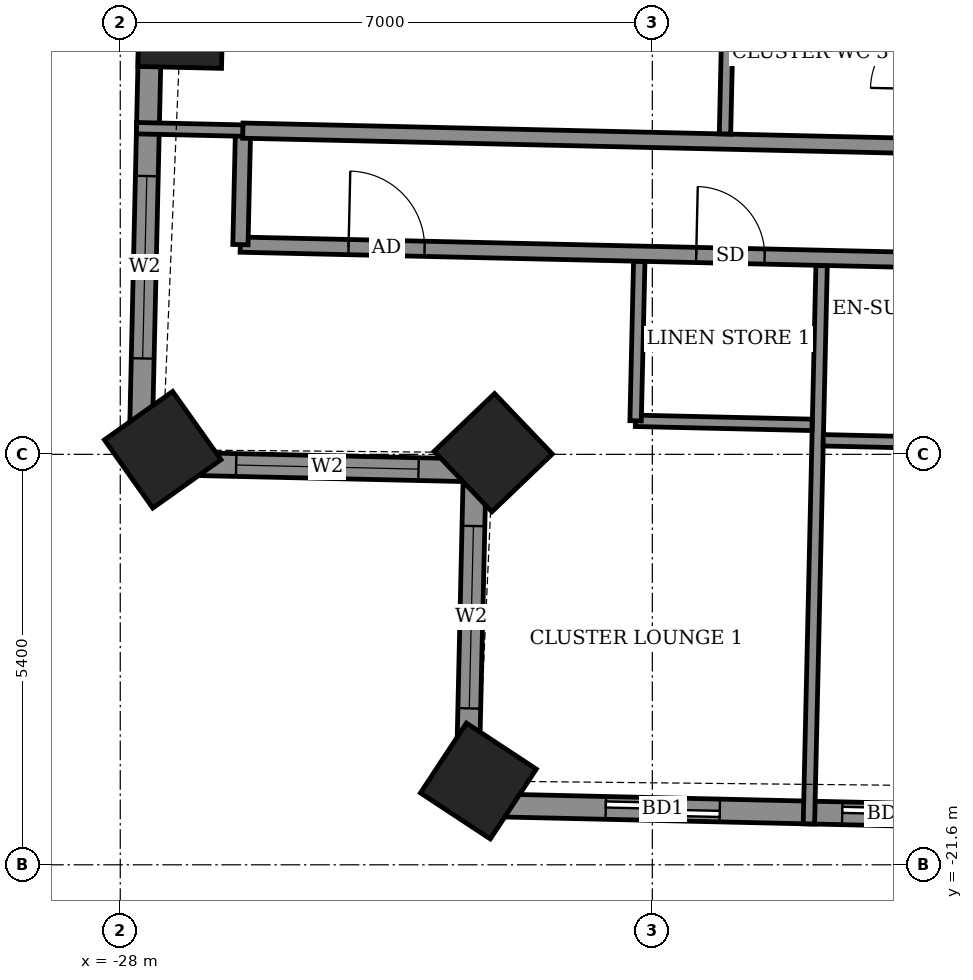
"""IFC4 building model, lengths in metres.
Left out: names, types, materials, properties, quantities, classifications, styles, units other than length and angle.
Written with IfcOpenShell. Run it as: python <this file> out.ifc"""

import sys

from ifc_helpers import new_model, si_unit, direction, frame, frame_2d, origin, origin_2d, place, context, subcontext, project, spatial, rectangle, extrude, element, fill, save


model = new_model("IFC4")
c1 = context("Model", 3, precision=1e-05, world=origin(), true_north=direction((0.0, 1.0)))
c2 = subcontext(c1, "Body", "Model", "MODEL_VIEW")
j1 = project(units=[si_unit("LENGTHUNIT", "METRE"), si_unit("PLANEANGLEUNIT", "RADIAN")], contexts=[c1])
p1 = place(None, origin())
s1 = spatial("IfcSite", under=j1, at=p1, CompositionType="ELEMENT")
p2 = place(p1, origin())
s2 = spatial("IfcBuilding", under=s1, at=p2, CompositionType="ELEMENT")
p3 = place(p2, frame((0.0, 0.0, 208.7)))
s3 = spatial("IfcBuildingStorey", under=s2, at=p3, CompositionType="ELEMENT", Elevation=208.7)
for number, where, z_axis, x_axis in (
    (1, (-27.205, -10.56, -0.55), (0.0, 0.0, 1.0), (-0.023, -1.0, 0.0)),
    (2, (-27.441, -16.14, -0.55), (0.0, 0.0, 1.0), (0.579, -0.816, 0.0)),
    (3, (-23.093, -16.178, -0.55), (0.0, 0.0, 1.0), (0.691, -0.723, 0.0)),
    (4, (-23.289, -20.498, -0.55), (0.0, 0.0, 1.0), (0.835, -0.55, 0.0)),
):
    element("IfcColumn", number, at=place(p3, frame(where, z_axis=z_axis, x_axis=x_axis)), inside=s3, PredefinedType="COLUMN", context=c2, shape_type="SweptSolid", body=[
        extrude(rectangle(XDim=1.1, YDim=1.1, at=origin_2d()), origin(), (0.0, 0.0, 1.0), 3.6),
    ])
p4 = place(p3, frame((-27.459, -4.091, 0.0), z_axis=(0.0, 0.0, 1.0), x_axis=(-0.022668325129, -0.999743040504, 0.0)))
e5 = element("IfcWall", 5, at=p4, inside=s3, PredefinedType="SOLIDWALL", context=c2, shape_type="SweptSolid", body=[
    extrude(rectangle(XDim=12.224, YDim=0.3, at=frame_2d((6.112, 0.0))), origin(), (0.0, 0.0, 1.0), 2.55),
])
p5 = place(p4, frame((1.462, 0.0, 0.0)))
e6 = element("IfcOpeningElement", 6, at=p5, cuts=e5, PredefinedType="OPENING", context=c2, shape_type="SweptSolid", body=[
    extrude(rectangle(XDim=1.5, YDim=2.4, at=frame_2d((0.75, 1.2))), frame((0.0, 0.16, 0.0), z_axis=(0.0, -1.0, 0.0), x_axis=(1.0, 0.0, 0.0)), (0.0, 0.0, 1.0), 0.32),
])
p6 = place(p4, frame((4.243, 0.0, 0.9)))
e7 = element("IfcOpeningElement", 7, at=p6, cuts=e5, PredefinedType="OPENING", context=c2, shape_type="SweptSolid", body=[
    extrude(rectangle(XDim=1.2, YDim=1.5, at=frame_2d((0.6, 0.75))), frame((0.0, 0.16, 0.0), z_axis=(0.0, -1.0, 0.0), x_axis=(1.0, 0.0, 0.0)), (0.0, 0.0, 1.0), 0.32),
])
p7 = place(p4, frame((8.45, 0.0, 0.9)))
e8 = element("IfcOpeningElement", 8, at=p7, cuts=e5, PredefinedType="OPENING", context=c2, shape_type="SweptSolid", body=[
    extrude(rectangle(XDim=2.4, YDim=1.5, at=frame_2d((1.2, 0.75))), frame((0.0, 0.16, 0.0), z_axis=(0.0, -1.0, 0.0), x_axis=(1.0, 0.0, 0.0)), (0.0, 0.0, 1.0), 0.32),
])
p8 = place(p3, frame((-27.736, -16.312, 0.0), z_axis=(0.0, 0.0, 1.0), x_axis=(0.999747504193, -0.022470599878, 0.0)))
e9 = element("IfcWall", 9, at=p8, inside=s3, PredefinedType="SOLIDWALL", context=c2, shape_type="SweptSolid", body=[
    extrude(rectangle(XDim=4.4, YDim=0.3, at=frame_2d((2.2, 0.0))), origin(), (0.0, 0.0, 1.0), 2.55),
])
p9 = place(p8, frame((1.261, 0.0, 0.9)))
e10 = element("IfcOpeningElement", 10, at=p9, cuts=e9, PredefinedType="OPENING", context=c2, shape_type="SweptSolid", body=[
    extrude(rectangle(XDim=2.4, YDim=1.5, at=frame_2d((1.2, 0.75))), frame((0.0, 0.16, 0.0), z_axis=(0.0, -1.0, 0.0), x_axis=(1.0, 0.0, 0.0)), (0.0, 0.0, 1.0), 0.32),
])
p10 = place(p3, frame((-23.337, -16.411, 0.0), z_axis=(0.0, 0.0, 1.0), x_axis=(-0.022747872013, -0.999741233679, 0.0)))
e11 = element("IfcWall", 11, at=p10, inside=s3, PredefinedType="SOLIDWALL", context=c2, shape_type="SweptSolid", body=[
    extrude(rectangle(XDim=4.4, YDim=0.3, at=frame_2d((2.2, 0.0))), origin(), (0.0, 0.0, 1.0), 2.55),
])
p11 = place(p10, frame((0.732, 0.0, 0.9)))
e12 = element("IfcOpeningElement", 12, at=p11, cuts=e11, PredefinedType="OPENING", context=c2, shape_type="SweptSolid", body=[
    extrude(rectangle(XDim=2.4, YDim=1.5, at=frame_2d((1.2, 0.75))), frame((0.0, 0.16, 0.0), z_axis=(0.0, -1.0, 0.0), x_axis=(1.0, 0.0, 0.0)), (0.0, 0.0, 1.0), 0.32),
])
p12 = place(p3, frame((-23.437, -20.81, 0.0), z_axis=(0.0, 0.0, 1.0), x_axis=(0.999742269115, -0.022702320244, 0.0)))
e13 = element("IfcWall", 13, at=p12, inside=s3, PredefinedType="SOLIDWALL", context=c2, shape_type="SweptSolid", body=[
    extrude(rectangle(XDim=41.844, YDim=0.3, at=frame_2d((20.922, 0.0))), origin(), (0.0, 0.0, 1.0), 2.55),
])
p13 = place(p12, frame((1.825, 0.0, 0.0)))
e14 = element("IfcOpeningElement", 14, at=p13, cuts=e13, PredefinedType="OPENING", context=c2, shape_type="SweptSolid", body=[
    extrude(rectangle(XDim=1.5, YDim=2.4, at=frame_2d((0.75, 1.2))), frame((0.0, 0.16, 0.0), z_axis=(0.0, -1.0, 0.0), x_axis=(1.0, 0.0, 0.0)), (0.0, 0.0, 1.0), 0.32),
])
p14 = place(p12, frame((4.937, 0.0, 0.0)))
e15 = element("IfcOpeningElement", 15, at=p14, cuts=e13, PredefinedType="OPENING", context=c2, shape_type="SweptSolid", body=[
    extrude(rectangle(XDim=1.2, YDim=2.4, at=frame_2d((0.6, 1.2))), frame((0.0, 0.16, 0.0), z_axis=(0.0, -1.0, 0.0), x_axis=(1.0, 0.0, 0.0)), (0.0, 0.0, 1.0), 0.32),
])
p15 = place(p12, frame((10.3, 0.0, 0.0)))
e16 = element("IfcOpeningElement", 16, at=p15, cuts=e13, PredefinedType="OPENING", context=c2, shape_type="SweptSolid", body=[
    extrude(rectangle(XDim=1.5, YDim=2.4, at=frame_2d((0.75, 1.2))), frame((0.0, 0.16, 0.0), z_axis=(0.0, -1.0, 0.0), x_axis=(1.0, 0.0, 0.0)), (0.0, 0.0, 1.0), 0.32),
])
p16 = place(p12, frame((15.224, 0.0, 0.0)))
e17 = element("IfcOpeningElement", 17, at=p16, cuts=e13, PredefinedType="OPENING", context=c2, shape_type="SweptSolid", body=[
    extrude(rectangle(XDim=1.5, YDim=2.4, at=frame_2d((0.75, 1.2))), frame((0.0, 0.16, 0.0), z_axis=(0.0, -1.0, 0.0), x_axis=(1.0, 0.0, 0.0)), (0.0, 0.0, 1.0), 0.32),
])
p17 = place(p12, frame((18.436, 0.0, 0.0)))
e18 = element("IfcOpeningElement", 18, at=p17, cuts=e13, PredefinedType="OPENING", context=c2, shape_type="SweptSolid", body=[
    extrude(rectangle(XDim=1.5, YDim=2.4, at=frame_2d((0.75, 1.2))), frame((0.0, 0.16, 0.0), z_axis=(0.0, -1.0, 0.0), x_axis=(1.0, 0.0, 0.0)), (0.0, 0.0, 1.0), 0.32),
])
p18 = place(p12, frame((23.825, 0.0, 0.0)))
e19 = element("IfcOpeningElement", 19, at=p18, cuts=e13, PredefinedType="OPENING", context=c2, shape_type="SweptSolid", body=[
    extrude(rectangle(XDim=1.5, YDim=2.4, at=frame_2d((0.75, 1.2))), frame((0.0, 0.16, 0.0), z_axis=(0.0, -1.0, 0.0), x_axis=(1.0, 0.0, 0.0)), (0.0, 0.0, 1.0), 0.32),
])
p19 = place(p12, frame((28.948, 0.0, 0.0)))
e20 = element("IfcOpeningElement", 20, at=p19, cuts=e13, PredefinedType="OPENING", context=c2, shape_type="SweptSolid", body=[
    extrude(rectangle(XDim=1.5, YDim=2.4, at=frame_2d((0.75, 1.2))), frame((0.0, 0.16, 0.0), z_axis=(0.0, -1.0, 0.0), x_axis=(1.0, 0.0, 0.0)), (0.0, 0.0, 1.0), 0.32),
])
p20 = place(p12, frame((32.16, 0.0, 0.0)))
e21 = element("IfcOpeningElement", 21, at=p20, cuts=e13, PredefinedType="OPENING", context=c2, shape_type="SweptSolid", body=[
    extrude(rectangle(XDim=1.5, YDim=2.4, at=frame_2d((0.75, 1.2))), frame((0.0, 0.16, 0.0), z_axis=(0.0, -1.0, 0.0), x_axis=(1.0, 0.0, 0.0)), (0.0, 0.0, 1.0), 0.32),
])
p21 = place(p12, frame((37.224, 0.0, 0.9)))
e22 = element("IfcOpeningElement", 22, at=p21, cuts=e13, PredefinedType="OPENING", context=c2, shape_type="SweptSolid", body=[
    extrude(rectangle(XDim=2.4, YDim=1.5, at=frame_2d((1.2, 0.75))), frame((0.0, 0.16, 0.0), z_axis=(0.0, -1.0, 0.0), x_axis=(1.0, 0.0, 0.0)), (0.0, 0.0, 1.0), 0.32),
])
p22 = place(p3, frame((-18.94, -21.062, 0.0), z_axis=(0.0, 0.0, 1.0), x_axis=(0.022720650804, 0.999741852694, 0.0)))
e23 = element("IfcWall", 23, at=p22, inside=s3, PredefinedType="PARTITIONING", context=c2, shape_type="SweptSolid", body=[
    extrude(rectangle(XDim=7.35, YDim=0.15, at=frame_2d((3.675, 0.0))), origin(), (0.0, 0.0, 1.0), 2.55),
])
for number, where, z_axis, x_axis in (
    (24, (-18.752, -16.015, 0.0), (0.0, 0.0, 1.0), (1.0, -0.023, 0.0)),
    (25, (-21.222, -15.759, 0.0), (0.0, 0.0, 1.0), (1.0, -0.023, 0.0)),
):
    element("IfcWall", number, at=place(p3, frame(where, z_axis=z_axis, x_axis=x_axis)), inside=s3, PredefinedType="PARTITIONING", context=c2, shape_type="SweptSolid", body=[
        extrude(rectangle(XDim=2.324, YDim=0.15, at=frame_2d((1.162, 0.0))), origin(), (0.0, 0.0, 1.0), 3.05),
    ])
p23 = place(p3, frame((-21.22, -15.759, 0.0), z_axis=(0.0, 0.0, 1.0), x_axis=(0.02279007832, 0.999740272436, 0.0)))
e26 = element("IfcWall", 26, at=p23, inside=s3, PredefinedType="PARTITIONING", context=c2, shape_type="SweptSolid", body=[
    extrude(rectangle(XDim=2.1, YDim=0.15, at=frame_2d((1.05, 0.0))), origin(), (0.0, 0.0, 1.0), 3.05),
])
p24 = place(p3, frame((-26.421, -13.441, 0.0), z_axis=(0.0, 0.0, 1.0), x_axis=(0.999742754064, -0.022680954485, 0.0)))
e27 = element("IfcWall", 27, at=p24, inside=s3, PredefinedType="PARTITIONING", context=c2, shape_type="SweptSolid", body=[
    extrude(rectangle(XDim=48.945, YDim=0.2, at=frame_2d((24.472, 0.0))), origin(), (0.0, 0.0, 1.0), 3.05),
])
p25 = place(p24, frame((1.425, 0.0, 0.0)))
e28 = element("IfcOpeningElement", 28, at=p25, cuts=e27, PredefinedType="OPENING", context=c2, shape_type="SweptSolid", body=[
    extrude(rectangle(XDim=1.0, YDim=2.1, at=frame_2d((0.5, 1.05))), frame((0.0, 0.11, 0.0), z_axis=(0.0, -1.0, 0.0), x_axis=(1.0, 0.0, 0.0)), (0.0, 0.0, 1.0), 0.22),
])
p26 = place(p24, frame((6.0, 0.0, 0.0)))
e29 = element("IfcOpeningElement", 29, at=p26, cuts=e27, PredefinedType="OPENING", context=c2, shape_type="SweptSolid", body=[
    extrude(rectangle(XDim=0.9, YDim=2.1, at=frame_2d((0.45, 1.05))), frame((0.0, 0.11, 0.0), z_axis=(0.0, -1.0, 0.0), x_axis=(1.0, 0.0, 0.0)), (0.0, 0.0, 1.0), 0.22),
])
p27 = place(p24, frame((10.55, 0.0, 0.0)))
e30 = element("IfcOpeningElement", 30, at=p27, cuts=e27, PredefinedType="OPENING", context=c2, shape_type="SweptSolid", body=[
    extrude(rectangle(XDim=0.9, YDim=2.1, at=frame_2d((0.45, 1.05))), frame((0.0, 0.11, 0.0), z_axis=(0.0, -1.0, 0.0), x_axis=(1.0, 0.0, 0.0)), (0.0, 0.0, 1.0), 0.22),
])
p28 = place(p24, frame((12.55, 0.0, 0.0)))
e31 = element("IfcOpeningElement", 31, at=p28, cuts=e27, PredefinedType="OPENING", context=c2, shape_type="SweptSolid", body=[
    extrude(rectangle(XDim=0.9, YDim=2.1, at=frame_2d((0.45, 1.05))), frame((0.0, 0.11, 0.0), z_axis=(0.0, -1.0, 0.0), x_axis=(1.0, 0.0, 0.0)), (0.0, 0.0, 1.0), 0.22),
])
p29 = place(p24, frame((19.425, 0.0, 0.0)))
e32 = element("IfcOpeningElement", 32, at=p29, cuts=e27, PredefinedType="OPENING", context=c2, shape_type="SweptSolid", body=[
    extrude(rectangle(XDim=0.9, YDim=2.1, at=frame_2d((0.45, 1.05))), frame((0.0, 0.11, 0.0), z_axis=(0.0, -1.0, 0.0), x_axis=(1.0, 0.0, 0.0)), (0.0, 0.0, 1.0), 0.22),
])
p30 = place(p24, frame((21.525, 0.0, 0.0)))
e33 = element("IfcOpeningElement", 33, at=p30, cuts=e27, PredefinedType="OPENING", context=c2, shape_type="SweptSolid", body=[
    extrude(rectangle(XDim=0.9, YDim=2.1, at=frame_2d((0.45, 1.05))), frame((0.0, 0.11, 0.0), z_axis=(0.0, -1.0, 0.0), x_axis=(1.0, 0.0, 0.0)), (0.0, 0.0, 1.0), 0.22),
])
p31 = place(p24, frame((28.475, 0.0, 0.0)))
e34 = element("IfcOpeningElement", 34, at=p31, cuts=e27, PredefinedType="OPENING", context=c2, shape_type="SweptSolid", body=[
    extrude(rectangle(XDim=0.9, YDim=2.1, at=frame_2d((0.45, 1.05))), frame((0.0, 0.11, 0.0), z_axis=(0.0, -1.0, 0.0), x_axis=(1.0, 0.0, 0.0)), (0.0, 0.0, 1.0), 0.22),
])
p32 = place(p24, frame((30.5, 0.0, 0.0)))
e35 = element("IfcOpeningElement", 35, at=p32, cuts=e27, PredefinedType="OPENING", context=c2, shape_type="SweptSolid", body=[
    extrude(rectangle(XDim=0.9, YDim=2.1, at=frame_2d((0.45, 1.05))), frame((0.0, 0.11, 0.0), z_axis=(0.0, -1.0, 0.0), x_axis=(1.0, 0.0, 0.0)), (0.0, 0.0, 1.0), 0.22),
])
p33 = place(p24, frame((37.35, 0.0, 0.0)))
e36 = element("IfcOpeningElement", 36, at=p33, cuts=e27, PredefinedType="OPENING", context=c2, shape_type="SweptSolid", body=[
    extrude(rectangle(XDim=0.9, YDim=2.1, at=frame_2d((0.45, 1.05))), frame((0.0, 0.11, 0.0), z_axis=(0.0, -1.0, 0.0), x_axis=(1.0, 0.0, 0.0)), (0.0, 0.0, 1.0), 0.22),
])
p34 = place(p24, frame((45.422, 0.0, 0.0)))
e37 = element("IfcOpeningElement", 37, at=p34, cuts=e27, PredefinedType="OPENING", context=c2, shape_type="SweptSolid", body=[
    extrude(rectangle(XDim=1.0, YDim=2.1, at=frame_2d((0.5, 1.05))), frame((0.0, 0.11, 0.0), z_axis=(0.0, -1.0, 0.0), x_axis=(1.0, 0.0, 0.0)), (0.0, 0.0, 1.0), 0.22),
])
p35 = place(p24, frame((39.75, 0.0, 0.0)))
e38 = element("IfcOpeningElement", 38, at=p35, cuts=e27, PredefinedType="OPENING", context=c2, shape_type="SweptSolid", body=[
    extrude(rectangle(XDim=0.9, YDim=2.1, at=frame_2d((0.45, 1.05))), frame((0.0, 0.11, 0.0), z_axis=(0.0, -1.0, 0.0), x_axis=(1.0, 0.0, 0.0)), (0.0, 0.0, 1.0), 0.22),
])
p36 = place(p3, frame((-26.419, -13.441, 0.0), z_axis=(0.0, 0.0, 1.0), x_axis=(0.022617910375, 0.999744182344, 0.0)))
e39 = element("IfcWall", 39, at=p36, inside=s3, PredefinedType="PARTITIONING", context=c2, shape_type="SweptSolid", body=[
    extrude(rectangle(XDim=1.5, YDim=0.2, at=frame_2d((0.75, 0.0))), origin(), (0.0, 0.0, 1.0), 3.05),
])
p37 = place(p3, frame((-27.786, -11.909, 0.0), z_axis=(0.0, 0.0, 1.0), x_axis=(0.999740216184, -0.022792545827, 0.0)))
e40 = element("IfcWall", 40, at=p37, inside=s3, PredefinedType="PARTITIONING", context=c2, shape_type="SweptSolid", body=[
    extrude(rectangle(XDim=1.403, YDim=0.15, at=frame_2d((0.702, 0.0))), origin(), (0.0, 0.0, 1.0), 2.55),
])
p38 = place(p3, frame((-26.387, -11.941, 0.0), z_axis=(0.0, 0.0, 1.0), x_axis=(0.999741076645, -0.022754772455, 0.0)))
e41 = element("IfcWall", 41, at=p38, inside=s3, PredefinedType="PARTITIONING", context=c2, shape_type="SweptSolid", body=[
    extrude(rectangle(XDim=9.141, YDim=0.2, at=frame_2d((4.571, 0.0))), origin(), (0.0, 0.0, 1.0), 3.05),
])
p39 = place(p3, frame((-20.044, -11.985, 0.0), z_axis=(0.0, 0.0, 1.0), x_axis=(0.022612884682, 0.999744296031, 0.0)))
e42 = element("IfcWall", 42, at=p39, inside=s3, PredefinedType="PARTITIONING", context=c2, shape_type="SweptSolid", body=[
    extrude(rectangle(XDim=2.3, YDim=0.15, at=frame_2d((1.15, 0.0))), origin(), (0.0, 0.0, 1.0), 3.05),
])
p40 = place(p7, origin())
e43 = element("IfcWindow", 43, at=p40, inside=s3, PartitioningType="DOUBLE_PANEL_VERTICAL", PredefinedType="WINDOW", context=c2, shape_type="SweptSolid", body=[
    extrude(rectangle(XDim=2.4, YDim=1.5, at=frame_2d((1.2, 0.75))), frame((0.0, 0.03, 0.0), z_axis=(0.0, -1.0, 0.0), x_axis=(1.0, 0.0, 0.0)), (0.0, 0.0, 1.0), 0.06),
])
fill(e8, e43)
p41 = place(p9, origin())
e44 = element("IfcWindow", 44, at=p41, inside=s3, PartitioningType="DOUBLE_PANEL_VERTICAL", PredefinedType="WINDOW", context=c2, shape_type="SweptSolid", body=[
    extrude(rectangle(XDim=2.4, YDim=1.5, at=frame_2d((1.2, 0.75))), frame((0.0, 0.03, 0.0), z_axis=(0.0, -1.0, 0.0), x_axis=(1.0, 0.0, 0.0)), (0.0, 0.0, 1.0), 0.06),
])
fill(e10, e44)
p42 = place(p11, origin())
e45 = element("IfcWindow", 45, at=p42, inside=s3, PartitioningType="DOUBLE_PANEL_VERTICAL", PredefinedType="WINDOW", context=c2, shape_type="SweptSolid", body=[
    extrude(rectangle(XDim=2.4, YDim=1.5, at=frame_2d((1.2, 0.75))), frame((0.0, 0.03, 0.0), z_axis=(0.0, -1.0, 0.0), x_axis=(1.0, 0.0, 0.0)), (0.0, 0.0, 1.0), 0.06),
])
fill(e12, e45)
p43 = place(p13, origin())
e46 = element("IfcDoor", 46, at=p43, inside=s3, OperationType="SLIDING_TO_LEFT", PredefinedType="DOOR", context=c2, shape_type="SweptSolid", body=[
    extrude(rectangle(XDim=1.5, YDim=2.4, at=frame_2d((0.75, 1.2))), frame((0.0, 0.025, 0.0), z_axis=(0.0, -1.0, 0.0), x_axis=(1.0, 0.0, 0.0)), (0.0, 0.0, 1.0), 0.05),
])
fill(e14, e46)
p44 = place(p14, origin())
e47 = element("IfcDoor", 47, at=p44, inside=s3, OperationType="SLIDING_TO_LEFT", PredefinedType="DOOR", context=c2, shape_type="SweptSolid", body=[
    extrude(rectangle(XDim=1.2, YDim=2.4, at=frame_2d((0.6, 1.2))), frame((0.0, 0.025, 0.0), z_axis=(0.0, -1.0, 0.0), x_axis=(1.0, 0.0, 0.0)), (0.0, 0.0, 1.0), 0.05),
])
fill(e15, e47)
p45 = place(p25, origin())
e48 = element("IfcDoor", 48, at=p45, inside=s3, OperationType="SINGLE_SWING_LEFT", PredefinedType="DOOR", context=c2, shape_type="SweptSolid", body=[
    extrude(rectangle(XDim=1.0, YDim=2.1, at=frame_2d((0.5, 1.05))), frame((0.0, 0.025, 0.0), z_axis=(0.0, -1.0, 0.0), x_axis=(1.0, 0.0, 0.0)), (0.0, 0.0, 1.0), 0.05),
])
fill(e28, e48)
p46 = place(p26, origin())
e49 = element("IfcDoor", 49, at=p46, inside=s3, OperationType="SINGLE_SWING_LEFT", PredefinedType="DOOR", context=c2, shape_type="SweptSolid", body=[
    extrude(rectangle(XDim=0.9, YDim=2.1, at=frame_2d((0.45, 1.05))), frame((0.0, 0.025, 0.0), z_axis=(0.0, -1.0, 0.0), x_axis=(1.0, 0.0, 0.0)), (0.0, 0.0, 1.0), 0.05),
])
fill(e29, e49)
save(model, sys.argv[1])
